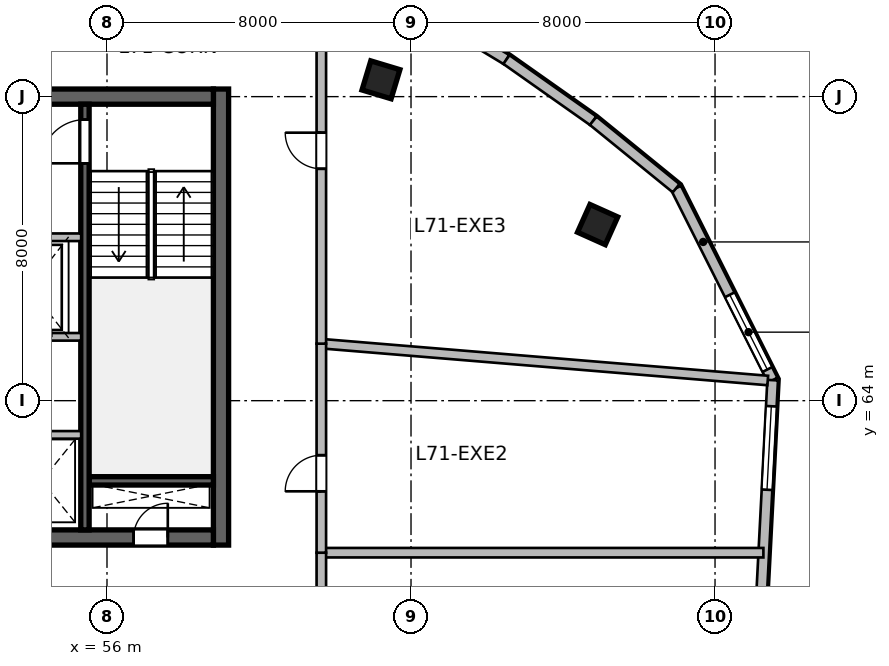
"""IFC4 building model, lengths in metres.
Left out: names, types, materials, properties, quantities, classifications, styles, units other than length and angle.
Written with IfcOpenShell. Run it as: python <this file> out.ifc"""

import sys

from ifc_helpers import new_model, si_unit, direction, frame, frame_2d, origin, origin_2d, place, context, subcontext, project, spatial, rectangle, extrude, source, transform, mapped, element, fill, save


model = new_model("IFC4")
c1 = context("Model", 3, precision=1e-05, world=origin(), true_north=direction((0.0, 1.0)))
c2 = subcontext(c1, "Body", "Model", "MODEL_VIEW")
j1 = project(units=[si_unit("LENGTHUNIT", "METRE"), si_unit("PLANEANGLEUNIT", "RADIAN")], contexts=[c1])
p1 = place(None, origin())
s1 = spatial("IfcSite", under=j1, at=p1, CompositionType="ELEMENT")
p2 = place(p1, origin())
s2 = spatial("IfcBuilding", under=s1, at=p2, CompositionType="ELEMENT")
p3 = place(p2, frame((0.0, 0.0, 291.3)))
s3 = spatial("IfcBuildingStorey", under=s2, at=p3, CompositionType="ELEMENT", Elevation=291.3)
m1 = source(origin(), c2, "Body", "SweptSolid", [
    extrude(rectangle(XDim=12.0, YDim=0.4, at=frame_2d((6.0, 0.0))), origin(), (0.0, 0.0, 1.0), 3.9),
])
p4 = place(p3, frame((59.0, 60.2, 0.0), z_axis=(0.0, 0.0, 1.0), x_axis=(0.0, 1.0, 0.0)))
e1 = element("IfcWall", 1, at=p4, inside=s3, PredefinedType="SHEAR", context=c2, shape_type="MappedRepresentation", body=[
    mapped(m1, transform((0.0, 0.0, 0.0), scale=1.0)),
])
m2 = source(origin(), c2, "Body", "SweptSolid", [
    extrude(rectangle(XDim=21.6, YDim=0.4, at=frame_2d((10.8, 0.0))), origin(), (0.0, 0.0, 1.0), 3.9),
])
p5 = place(p3, frame((37.2, 60.4, 0.0), z_axis=(0.0, 0.0, 1.0), x_axis=(1.0, 0.0, 0.0)))
e2 = element("IfcWall", 2, at=p5, inside=s3, PredefinedType="SHEAR", context=c2, shape_type="MappedRepresentation", body=[
    mapped(m2, transform((0.0, 0.0, 0.0), scale=1.0)),
])
p6 = place(p5, frame((1.1, 0.0, 0.0)))
e3 = element("IfcOpeningElement", 3, at=p6, cuts=e2, PredefinedType="OPENING", context=c2, shape_type="SweptSolid", body=[
    extrude(rectangle(XDim=1.15, YDim=2.15, at=frame_2d((0.575, 1.075))), frame((0.0, 0.21, 0.0), z_axis=(0.0, -1.0, 0.0), x_axis=(1.0, 0.0, 0.0)), (0.0, 0.0, 1.0), 0.42),
])
p7 = place(p5, frame((19.5, 0.0, 0.0)))
e4 = element("IfcOpeningElement", 4, at=p7, cuts=e2, PredefinedType="OPENING", context=c2, shape_type="SweptSolid", body=[
    extrude(rectangle(XDim=0.9, YDim=2.1, at=frame_2d((0.45, 1.05))), frame((0.0, 0.21, 0.0), z_axis=(0.0, -1.0, 0.0), x_axis=(1.0, 0.0, 0.0)), (0.0, 0.0, 1.0), 0.42),
])
p8 = place(p5, frame((12.02, 0.0, 0.0)))
e5 = element("IfcOpeningElement", 5, at=p8, cuts=e2, PredefinedType="OPENING", context=c2, shape_type="SweptSolid", body=[
    extrude(rectangle(XDim=1.6, YDim=2.15, at=frame_2d((0.8, 1.075))), frame((0.0, 0.21, 0.0), z_axis=(0.0, -1.0, 0.0), x_axis=(1.0, 0.0, 0.0)), (0.0, 0.0, 1.0), 0.42),
])
p9 = place(p3, frame((37.2, 72.0, 0.0), z_axis=(0.0, 0.0, 1.0), x_axis=(1.0, 0.0, 0.0)))
e6 = element("IfcWall", 6, at=p9, inside=s3, PredefinedType="SHEAR", context=c2, shape_type="MappedRepresentation", body=[
    mapped(m2, transform((0.0, 0.0, 0.0), scale=1.0)),
])
p10 = place(p9, frame((1.2, 0.0, 0.0)))
e7 = element("IfcOpeningElement", 7, at=p10, cuts=e6, PredefinedType="OPENING", context=c2, shape_type="SweptSolid", body=[
    extrude(rectangle(XDim=0.9, YDim=2.1, at=frame_2d((0.45, 1.05))), frame((0.0, 0.21, 0.0), z_axis=(0.0, -1.0, 0.0), x_axis=(1.0, 0.0, 0.0)), (0.0, 0.0, 1.0), 0.42),
])
p11 = place(p9, frame((14.7, 0.0, 0.0)))
e8 = element("IfcOpeningElement", 8, at=p11, cuts=e6, PredefinedType="OPENING", context=c2, shape_type="SweptSolid", body=[
    extrude(rectangle(XDim=1.2, YDim=2.15, at=frame_2d((0.6, 1.075))), frame((0.0, 0.21, 0.0), z_axis=(0.0, -1.0, 0.0), x_axis=(1.0, 0.0, 0.0)), (0.0, 0.0, 1.0), 0.42),
])
p12 = place(p9, frame((4.15, 0.0, 0.0)))
e9 = element("IfcOpeningElement", 9, at=p12, cuts=e6, PredefinedType="OPENING", context=c2, shape_type="SweptSolid", body=[
    extrude(rectangle(XDim=1.3, YDim=2.15, at=frame_2d((0.65, 1.075))), frame((0.0, 0.21, 0.0), z_axis=(0.0, -1.0, 0.0), x_axis=(1.0, 0.0, 0.0)), (0.0, 0.0, 1.0), 0.42),
])
p13 = place(p9, frame((7.1, 0.0, 0.0)))
e10 = element("IfcOpeningElement", 10, at=p13, cuts=e6, PredefinedType="OPENING", context=c2, shape_type="SweptSolid", body=[
    extrude(rectangle(XDim=0.9, YDim=2.1, at=frame_2d((0.45, 1.05))), frame((0.0, 0.21, 0.0), z_axis=(0.0, -1.0, 0.0), x_axis=(1.0, 0.0, 0.0)), (0.0, 0.0, 1.0), 0.42),
])
m3 = source(origin(), c2, "Body", "SweptSolid", [
    extrude(rectangle(XDim=3.27, YDim=0.22, at=frame_2d((1.635, 0.0))), origin(), (0.0, 0.0, 1.0), 3.9),
])
p14 = place(p3, frame((55.53, 61.89, 0.0), z_axis=(0.0, 0.0, 1.0), x_axis=(1.0, 0.0, 0.0)))
e11 = element("IfcWall", 11, at=p14, inside=s3, PredefinedType="SHEAR", context=c2, shape_type="MappedRepresentation", body=[
    mapped(m3, transform((0.0, 0.0, 0.0), scale=1.0)),
])
m4 = source(origin(), c2, "Body", "SweptSolid", [
    extrude(rectangle(XDim=11.2, YDim=0.22, at=frame_2d((5.6, 0.0))), origin(), (0.0, 0.0, 1.0), 3.9),
])
p15 = place(p3, frame((55.42, 60.6, 0.0), z_axis=(0.0, 0.0, 1.0), x_axis=(0.0, 1.0, 0.0)))
e12 = element("IfcWall", 12, at=p15, inside=s3, PredefinedType="SHEAR", context=c2, shape_type="MappedRepresentation", body=[
    mapped(m4, transform((0.0, 0.0, 0.0), scale=1.0)),
])
p16 = place(p15, frame((9.645, 0.0, 0.0)))
e13 = element("IfcOpeningElement", 13, at=p16, cuts=e12, PredefinedType="OPENING", context=c2, shape_type="SweptSolid", body=[
    extrude(rectangle(XDim=1.15, YDim=2.15, at=frame_2d((0.575, 1.075))), frame((0.0, 0.12, 0.0), z_axis=(0.0, -1.0, 0.0), x_axis=(1.0, 0.0, 0.0)), (0.0, 0.0, 1.0), 0.24),
])
m5 = source(origin(), c2, "Body", "SweptSolid", [
    extrude(rectangle(XDim=0.8, YDim=0.8, at=origin_2d()), origin(), (0.0, 0.0, 1.0), 3.9),
])
for number, where, z_axis, x_axis in (
    (14, (63.209, 72.442, 0.0), (0.0, 0.0, 1.0), (0.289, 0.957, 0.0)),
    (15, (68.91, 68.633, 0.0), (0.0, 0.0, 1.0), (0.409, 0.912, 0.0)),
):
    element("IfcColumn", number, at=place(p3, frame(where, z_axis=z_axis, x_axis=x_axis)), inside=s3, PredefinedType="COLUMN", context=c2, shape_type="MappedRepresentation", body=[
        mapped(m5, transform((0.0, 0.0, 0.0), scale=1.0)),
    ])
m6 = source(origin(), c2, "Body", "SweptSolid", [
    extrude(rectangle(XDim=5.653, YDim=0.28, at=frame_2d((2.827, 0.0))), origin(), (0.0, 0.0, 1.0), 3.64),
])
p17 = place(p3, frame((70.976, 69.591, 0.0), z_axis=(0.0, 0.0, 1.0), x_axis=(0.449302555419, -0.893379658205, 0.0)))
e16 = element("IfcWall", 16, at=p17, inside=s3, PredefinedType="SOLIDWALL", context=c2, shape_type="MappedRepresentation", body=[
    mapped(m6, transform((0.0, 0.0, 0.0), scale=1.0)),
])
p18 = place(p17, frame((3.14, 0.0, 0.95)))
e17 = element("IfcOpeningElement", 17, at=p18, cuts=e16, PredefinedType="OPENING", context=c2, shape_type="SweptSolid", body=[
    extrude(rectangle(XDim=2.2, YDim=2.1, at=frame_2d((1.1, 1.05))), frame((0.0, 0.15, 0.0), z_axis=(0.0, -1.0, 0.0), x_axis=(1.0, 0.0, 0.0)), (0.0, 0.0, 1.0), 0.3),
])
m7 = source(origin(), c2, "Body", "SweptSolid", [
    extrude(rectangle(XDim=7.151, YDim=0.28, at=frame_2d((3.576, 0.0))), origin(), (0.0, 0.0, 1.0), 3.64),
])
p19 = place(p3, frame((73.516, 64.54, 0.0), z_axis=(0.0, 0.0, 1.0), x_axis=(-0.051449614265, -0.998675591567, 0.0)))
e18 = element("IfcWall", 18, at=p19, inside=s3, PredefinedType="SOLIDWALL", context=c2, shape_type="MappedRepresentation", body=[
    mapped(m7, transform((0.0, 0.0, 0.0), scale=1.0)),
])
p20 = place(p19, frame((0.688, 0.0, 0.95)))
e19 = element("IfcOpeningElement", 19, at=p20, cuts=e18, PredefinedType="OPENING", context=c2, shape_type="SweptSolid", body=[
    extrude(rectangle(XDim=2.2, YDim=2.1, at=frame_2d((1.1, 1.05))), frame((0.0, 0.15, 0.0), z_axis=(0.0, -1.0, 0.0), x_axis=(1.0, 0.0, 0.0)), (0.0, 0.0, 1.0), 0.3),
])
m8 = source(origin(), c2, "Body", "SweptSolid", [
    extrude(rectangle(XDim=2.748, YDim=0.28, at=frame_2d((1.374, 0.0))), origin(), (0.0, 0.0, 1.0), 3.64),
])
p21 = place(p3, frame((64.157, 74.396, 0.0), z_axis=(0.0, 0.0, 1.0), x_axis=(0.856149718453, -0.516727838996, 0.0)))
e20 = element("IfcWall", 20, at=p21, inside=s3, PredefinedType="SOLIDWALL", context=c2, shape_type="MappedRepresentation", body=[
    mapped(m8, transform((0.0, 0.0, 0.0), scale=1.0)),
])
m9 = source(origin(), c2, "Body", "SweptSolid", [
    extrude(rectangle(XDim=2.795, YDim=0.28, at=frame_2d((1.397, 0.0))), origin(), (0.0, 0.0, 1.0), 3.64),
])
p22 = place(p3, frame((66.51, 72.975, 0.0), z_axis=(0.0, 0.0, 1.0), x_axis=(0.817265517835, -0.576261289136, 0.0)))
e21 = element("IfcWall", 21, at=p22, inside=s3, PredefinedType="SOLIDWALL", context=c2, shape_type="MappedRepresentation", body=[
    mapped(m9, transform((0.0, 0.0, 0.0), scale=1.0)),
])
m10 = source(origin(), c2, "Body", "SweptSolid", [
    extrude(rectangle(XDim=2.812, YDim=0.28, at=frame_2d((1.406, 0.0))), origin(), (0.0, 0.0, 1.0), 3.64),
])
p23 = place(p3, frame((68.795, 71.365, 0.0), z_axis=(0.0, 0.0, 1.0), x_axis=(0.775880230716, -0.630880232361, 0.0)))
e22 = element("IfcWall", 22, at=p23, inside=s3, PredefinedType="SOLIDWALL", context=c2, shape_type="MappedRepresentation", body=[
    mapped(m10, transform((0.0, 0.0, 0.0), scale=1.0)),
])
m11 = source(origin(), c2, "Body", "SweptSolid", [
    extrude(rectangle(XDim=5.62, YDim=0.2, at=frame_2d((2.81, 0.0))), origin(), (0.0, 0.0, 1.0), 3.64),
])
p24 = place(p3, frame((49.7, 68.3, 0.0), z_axis=(0.0, 0.0, 1.0), x_axis=(1.0, 0.0, 0.0)))
e23 = element("IfcWall", 23, at=p24, inside=s3, PredefinedType="SOLIDWALL", context=c2, shape_type="MappedRepresentation", body=[
    mapped(m11, transform((0.0, 0.0, 0.0), scale=1.0)),
])
p25 = place(p24, frame((1.6, 0.0, 0.0)))
e24 = element("IfcOpeningElement", 24, at=p25, cuts=e23, PredefinedType="OPENING", context=c2, shape_type="SweptSolid", body=[
    extrude(rectangle(XDim=1.1, YDim=2.15, at=frame_2d((0.55, 1.075))), frame((0.0, 0.11, 0.0), z_axis=(0.0, -1.0, 0.0), x_axis=(1.0, 0.0, 0.0)), (0.0, 0.0, 1.0), 0.22),
])
p26 = place(p24, frame((3.7, 0.0, 0.0)))
e25 = element("IfcOpeningElement", 25, at=p26, cuts=e23, PredefinedType="OPENING", context=c2, shape_type="SweptSolid", body=[
    extrude(rectangle(XDim=1.1, YDim=2.15, at=frame_2d((0.55, 1.075))), frame((0.0, 0.11, 0.0), z_axis=(0.0, -1.0, 0.0), x_axis=(1.0, 0.0, 0.0)), (0.0, 0.0, 1.0), 0.22),
])
p27 = place(p3, frame((49.7, 65.68, 0.0), z_axis=(0.0, 0.0, 1.0), x_axis=(1.0, 0.0, 0.0)))
e26 = element("IfcWall", 26, at=p27, inside=s3, PredefinedType="SOLIDWALL", context=c2, shape_type="MappedRepresentation", body=[
    mapped(m11, transform((0.0, 0.0, 0.0), scale=1.0)),
])
m12 = source(origin(), c2, "Body", "SweptSolid", [
    extrude(rectangle(XDim=4.1, YDim=0.2, at=frame_2d((2.05, 0.0))), origin(), (0.0, 0.0, 1.0), 3.64),
])
p28 = place(p3, frame((51.22, 63.1, 0.0), z_axis=(0.0, 0.0, 1.0), x_axis=(1.0, 0.0, 0.0)))
e27 = element("IfcWall", 27, at=p28, inside=s3, PredefinedType="SOLIDWALL", context=c2, shape_type="MappedRepresentation", body=[
    mapped(m12, transform((0.0, 0.0, 0.0), scale=1.0)),
])
m13 = source(origin(), c2, "Body", "SweptSolid", [
    extrude(rectangle(XDim=11.633, YDim=0.25, at=frame_2d((5.816, 0.0))), origin(), (0.0, 0.0, 1.0), 3.64),
])
p29 = place(p3, frame((61.64, 60.0, 0.0), z_axis=(0.0, 0.0, 1.0), x_axis=(1.0, 0.0, 0.0)))
e28 = element("IfcWall", 28, at=p29, inside=s3, PredefinedType="PARTITIONING", context=c2, shape_type="MappedRepresentation", body=[
    mapped(m13, transform((0.0, 0.0, 0.0), scale=1.0)),
])
m14 = source(origin(), c2, "Body", "SweptSolid", [
    extrude(rectangle(XDim=2.04, YDim=0.25, at=frame_2d((1.02, 0.0))), origin(), (0.0, 0.0, 1.0), 3.64),
])
p30 = place(p3, frame((61.64, 57.96, 0.0), z_axis=(0.0, 0.0, 1.0), x_axis=(0.0, 1.0, 0.0)))
e29 = element("IfcWall", 29, at=p30, inside=s3, PredefinedType="PARTITIONING", context=c2, shape_type="MappedRepresentation", body=[
    mapped(m14, transform((0.0, 0.0, 0.0), scale=1.0)),
])
m15 = source(origin(), c2, "Body", "SweptSolid", [
    extrude(rectangle(XDim=11.787, YDim=0.25, at=frame_2d((5.893, 0.0))), origin(), (0.0, 0.0, 1.0), 3.64),
])
p31 = place(p3, frame((61.64, 65.5, 0.0), z_axis=(0.0, 0.0, 1.0), x_axis=(0.996614976318, -0.082210637868, 0.0)))
e30 = element("IfcWall", 30, at=p31, inside=s3, PredefinedType="PARTITIONING", context=c2, shape_type="MappedRepresentation", body=[
    mapped(m15, transform((0.0, 0.0, 0.0), scale=1.0)),
])
m16 = source(origin(), c2, "Body", "SweptSolid", [
    extrude(rectangle(XDim=5.5, YDim=0.25, at=frame_2d((2.75, 0.0))), origin(), (0.0, 0.0, 1.0), 3.64),
])
p32 = place(p3, frame((61.64, 60.0, 0.0), z_axis=(0.0, 0.0, 1.0), x_axis=(0.0, 1.0, 0.0)))
e31 = element("IfcWall", 31, at=p32, inside=s3, PredefinedType="PARTITIONING", context=c2, shape_type="MappedRepresentation", body=[
    mapped(m16, transform((0.0, 0.0, 0.0), scale=1.0)),
])
p33 = place(p32, frame((1.615, 0.0, 0.0)))
e32 = element("IfcOpeningElement", 32, at=p33, cuts=e31, PredefinedType="OPENING", context=c2, shape_type="SweptSolid", body=[
    extrude(rectangle(XDim=0.95, YDim=2.1, at=frame_2d((0.475, 1.05))), frame((0.0, 0.135, 0.0), z_axis=(0.0, -1.0, 0.0), x_axis=(1.0, 0.0, 0.0)), (0.0, 0.0, 1.0), 0.27),
])
m17 = source(origin(), c2, "Body", "SweptSolid", [
    extrude(rectangle(XDim=10.153, YDim=0.25, at=frame_2d((5.077, 0.0))), origin(), (0.0, 0.0, 1.0), 3.64),
])
p34 = place(p3, frame((61.64, 65.5, 0.0), z_axis=(0.0, 0.0, 1.0), x_axis=(0.0, 1.0, 0.0)))
e33 = element("IfcWall", 33, at=p34, inside=s3, PredefinedType="PARTITIONING", context=c2, shape_type="MappedRepresentation", body=[
    mapped(m17, transform((0.0, 0.0, 0.0), scale=1.0)),
])
p35 = place(p34, frame((4.602, 0.0, 0.0)))
e34 = element("IfcOpeningElement", 34, at=p35, cuts=e33, PredefinedType="OPENING", context=c2, shape_type="SweptSolid", body=[
    extrude(rectangle(XDim=0.95, YDim=2.1, at=frame_2d((0.475, 1.05))), frame((0.0, 0.135, 0.0), z_axis=(0.0, -1.0, 0.0), x_axis=(1.0, 0.0, 0.0)), (0.0, 0.0, 1.0), 0.27),
])
m18 = source(origin(), c2, "Body", "SweptSolid", [
    extrude(rectangle(XDim=2.2, YDim=2.1, at=frame_2d((1.1, 1.05))), frame((0.0, 0.03, 0.0), z_axis=(0.0, -1.0, 0.0), x_axis=(1.0, 0.0, 0.0)), (0.0, 0.0, 1.0), 0.06),
])
p36 = place(p18, origin())
e35 = element("IfcWindow", 35, at=p36, inside=s3, PartitioningType="TRIPLE_PANEL_VERTICAL", PredefinedType="WINDOW", context=c2, shape_type="MappedRepresentation", body=[
    mapped(m18, transform((0.0, 0.0, 0.0), scale=1.0)),
])
fill(e17, e35)
p37 = place(p20, origin())
e36 = element("IfcWindow", 36, at=p37, inside=s3, PartitioningType="TRIPLE_PANEL_VERTICAL", PredefinedType="WINDOW", context=c2, shape_type="MappedRepresentation", body=[
    mapped(m18, transform((0.0, 0.0, 0.0), scale=1.0)),
])
fill(e19, e36)
m19 = source(origin(), c2, "Body", "SweptSolid", [
    extrude(rectangle(XDim=0.9, YDim=2.1, at=frame_2d((0.45, 1.05))), frame((0.0, 0.025, 0.0), z_axis=(0.0, -1.0, 0.0), x_axis=(1.0, 0.0, 0.0)), (0.0, 0.0, 1.0), 0.05),
])
p38 = place(p7, origin())
e37 = element("IfcDoor", 37, at=p38, inside=s3, OperationType="SINGLE_SWING_RIGHT", PredefinedType="DOOR", context=c2, shape_type="MappedRepresentation", body=[
    mapped(m19, transform((0.0, 0.0, 0.0), scale=1.0)),
])
fill(e4, e37)
m20 = source(origin(), c2, "Body", "SweptSolid", [
    extrude(rectangle(XDim=1.15, YDim=2.15, at=frame_2d((0.575, 1.075))), frame((0.0, 0.025, 0.0), z_axis=(0.0, -1.0, 0.0), x_axis=(1.0, 0.0, 0.0)), (0.0, 0.0, 1.0), 0.05),
])
p39 = place(p16, origin())
e38 = element("IfcDoor", 38, at=p39, inside=s3, OperationType="SINGLE_SWING_LEFT", PredefinedType="DOOR", context=c2, shape_type="MappedRepresentation", body=[
    mapped(m20, transform((0.0, 0.0, 0.0), scale=1.0)),
])
fill(e13, e38)
m21 = source(origin(), c2, "Body", "SweptSolid", [
    extrude(rectangle(XDim=0.95, YDim=2.1, at=frame_2d((0.475, 1.05))), frame((0.0, 0.025, 0.0), z_axis=(0.0, -1.0, 0.0), x_axis=(1.0, 0.0, 0.0)), (0.0, 0.0, 1.0), 0.05),
])
p40 = place(p33, origin())
e39 = element("IfcDoor", 39, at=p40, inside=s3, OperationType="SINGLE_SWING_LEFT", PredefinedType="DOOR", context=c2, shape_type="MappedRepresentation", body=[
    mapped(m21, transform((0.0, 0.0, 0.0), scale=1.0)),
])
fill(e32, e39)
p41 = place(p35, origin())
e40 = element("IfcDoor", 40, at=p41, inside=s3, OperationType="SINGLE_SWING_RIGHT", PredefinedType="DOOR", context=c2, shape_type="MappedRepresentation", body=[
    mapped(m21, transform((0.0, 0.0, 0.0), scale=1.0)),
])
fill(e34, e40)
save(model, sys.argv[1])
